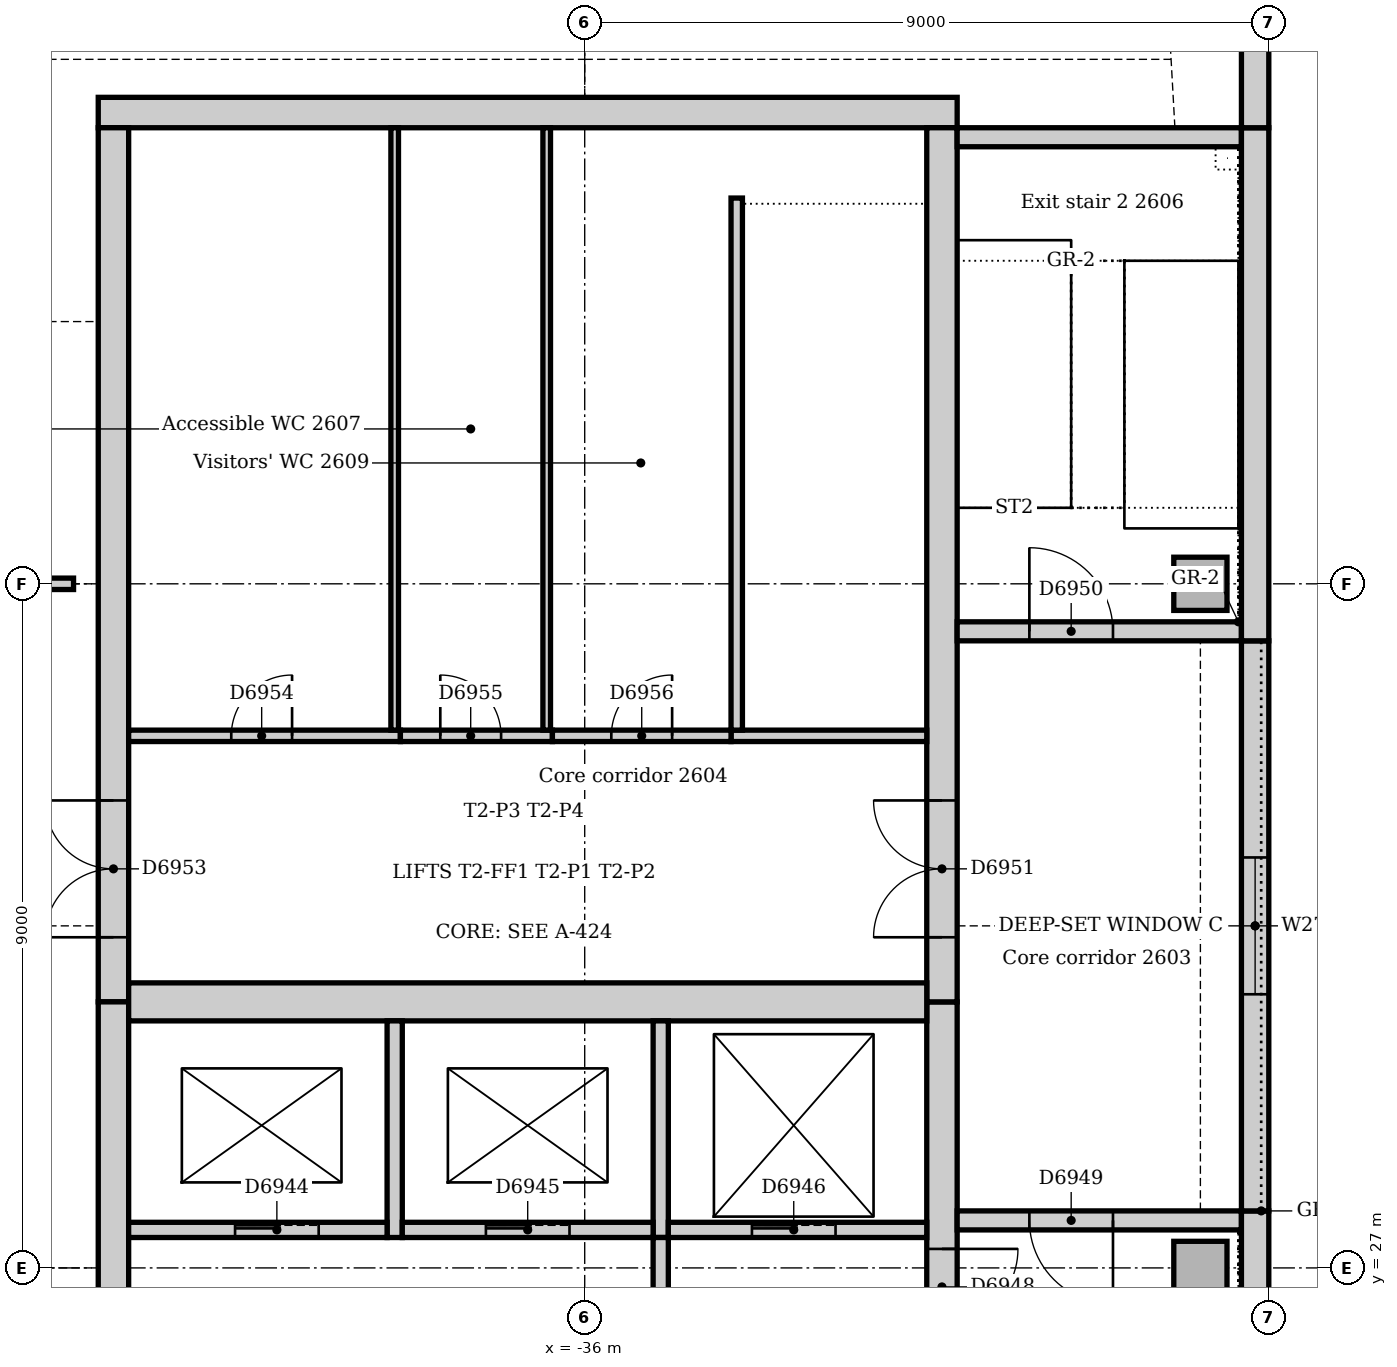
"""IFC4 building model, lengths in metres.
Left out: names, types, materials, properties, quantities, classifications, styles, units other than length and angle.
Written with IfcOpenShell. Run it as: python <this file> out.ifc"""

import sys

from ifc_helpers import new_model, si_unit, direction, frame, frame_2d, origin, origin_2d, place, context, subcontext, project, spatial, rectangle, extrude, element, fill, save


model = new_model("IFC4")
c1 = context("Model", 3, precision=1e-05, world=origin(), true_north=direction((0.0, 1.0)))
c2 = subcontext(c1, "Body", "Model", "MODEL_VIEW")
j1 = project(units=[si_unit("LENGTHUNIT", "METRE"), si_unit("PLANEANGLEUNIT", "RADIAN")], contexts=[c1])
p1 = place(None, origin())
s1 = spatial("IfcSite", under=j1, at=p1, CompositionType="ELEMENT")
p2 = place(p1, origin())
s2 = spatial("IfcBuilding", under=s1, at=p2, CompositionType="ELEMENT")
p3 = place(p2, frame((0.0, 0.0, 112.0)))
s3 = spatial("IfcBuildingStorey", under=s2, at=p3, CompositionType="ELEMENT", Elevation=112.0)
p4 = place(p3, frame((-31.1, 42.2, 0.0), z_axis=(0.0, 0.0, 1.0), x_axis=(-1.0, 0.0, 0.0)))
e1 = element("IfcWall", 1, at=p4, inside=s3, PredefinedType="SOLIDWALL", context=c2, shape_type="SweptSolid", body=[
    extrude(rectangle(XDim=11.3, YDim=0.4, at=frame_2d((5.65, 0.0))), origin(), (0.0, 0.0, 1.0), 4.0),
])
p5 = place(p3, frame((-31.3, 21.0, 0.0), z_axis=(0.0, 0.0, 1.0), x_axis=(0.0, 1.0, 0.0)))
e2 = element("IfcWall", 2, at=p5, inside=s3, PredefinedType="SOLIDWALL", context=c2, shape_type="SweptSolid", body=[
    extrude(rectangle(XDim=9.5, YDim=0.4, at=frame_2d((4.75, 0.0))), origin(), (0.0, 0.0, 1.0), 4.0),
])
p6 = place(p5, frame((5.25, 0.0, 0.0)))
e3 = element("IfcOpeningElement", 3, at=p6, cuts=e2, PredefinedType="OPENING", context=c2, shape_type="SweptSolid", body=[
    extrude(rectangle(XDim=1.0, YDim=2.1, at=frame_2d((0.5, 1.05))), frame((0.0, 0.21, 0.0), z_axis=(0.0, -1.0, 0.0), x_axis=(1.0, 0.0, 0.0)), (0.0, 0.0, 1.0), 0.42),
])
p7 = place(p3, frame((-31.3, 30.5, 0.0), z_axis=(0.0, 0.0, 1.0), x_axis=(0.0, 1.0, 0.0)))
e4 = element("IfcWall", 4, at=p7, inside=s3, PredefinedType="SOLIDWALL", context=c2, shape_type="SweptSolid", body=[
    extrude(rectangle(XDim=11.5, YDim=0.4, at=frame_2d((5.75, 0.0))), origin(), (0.0, 0.0, 1.0), 4.0),
])
p8 = place(p7, frame((0.85, 0.0, 0.0)))
e5 = element("IfcOpeningElement", 5, at=p8, cuts=e4, PredefinedType="OPENING", context=c2, shape_type="SweptSolid", body=[
    extrude(rectangle(XDim=1.8, YDim=2.1, at=frame_2d((0.9, 1.05))), frame((0.0, 0.21, 0.0), z_axis=(0.0, -1.0, 0.0), x_axis=(1.0, 0.0, 0.0)), (0.0, 0.0, 1.0), 0.42),
])
p9 = place(p3, frame((-42.2, 42.0, 0.0), z_axis=(0.0, 0.0, 1.0), x_axis=(0.0, -1.0, 0.0)))
e6 = element("IfcWall", 6, at=p9, inside=s3, PredefinedType="SOLIDWALL", context=c2, shape_type="SweptSolid", body=[
    extrude(rectangle(XDim=11.5, YDim=0.4, at=frame_2d((5.75, 0.0))), origin(), (0.0, 0.0, 1.0), 4.0),
])
p10 = place(p9, frame((8.85, 0.0, 0.0)))
e7 = element("IfcOpeningElement", 7, at=p10, cuts=e6, PredefinedType="OPENING", context=c2, shape_type="SweptSolid", body=[
    extrude(rectangle(XDim=1.8, YDim=2.1, at=frame_2d((0.9, 1.05))), frame((0.0, 0.21, 0.0), z_axis=(0.0, -1.0, 0.0), x_axis=(1.0, 0.0, 0.0)), (0.0, 0.0, 1.0), 0.42),
])
p11 = place(p3, frame((-42.2, 30.5, 0.0), z_axis=(0.0, 0.0, 1.0), x_axis=(0.0, -1.0, 0.0)))
e8 = element("IfcWall", 8, at=p11, inside=s3, PredefinedType="SOLIDWALL", context=c2, shape_type="SweptSolid", body=[
    extrude(rectangle(XDim=9.5, YDim=0.4, at=frame_2d((4.75, 0.0))), origin(), (0.0, 0.0, 1.0), 4.0),
])
p12 = place(p11, frame((3.85, 0.0, 0.0)))
e9 = element("IfcOpeningElement", 9, at=p12, cuts=e8, PredefinedType="OPENING", context=c2, shape_type="SweptSolid", body=[
    extrude(rectangle(XDim=1.8, YDim=2.1, at=frame_2d((0.9, 1.05))), frame((0.0, 0.21, 0.0), z_axis=(0.0, -1.0, 0.0), x_axis=(1.0, 0.0, 0.0)), (0.0, 0.0, 1.0), 0.42),
])
p13 = place(p3, frame((-42.0, 30.5, 0.0), z_axis=(0.0, 0.0, 1.0), x_axis=(1.0, 0.0, 0.0)))
e10 = element("IfcWall", 10, at=p13, inside=s3, PredefinedType="SOLIDWALL", context=c2, shape_type="SweptSolid", body=[
    extrude(rectangle(XDim=10.5, YDim=0.5, at=frame_2d((5.25, 0.0))), origin(), (0.0, 0.0, 1.0), 4.0),
])
p14 = place(p3, frame((-27.36, 27.625, 0.0), z_axis=(0.0, 0.0, 1.0), x_axis=(-1.0, 0.0, 0.0)))
e11 = element("IfcWall", 11, at=p14, inside=s3, PredefinedType="SOLIDWALL", context=c2, shape_type="SweptSolid", body=[
    extrude(rectangle(XDim=3.74, YDim=0.25, at=frame_2d((1.87, 0.0))), origin(), (0.0, 0.0, 1.0), 4.0),
])
p15 = place(p14, frame((1.69, 0.0, 0.0)))
e12 = element("IfcOpeningElement", 12, at=p15, cuts=e11, PredefinedType="OPENING", context=c2, shape_type="SweptSolid", body=[
    extrude(rectangle(XDim=1.1, YDim=2.1, at=frame_2d((0.55, 1.05))), frame((0.0, 0.135, 0.0), z_axis=(0.0, -1.0, 0.0), x_axis=(1.0, 0.0, 0.0)), (0.0, 0.0, 1.0), 0.27),
])
p16 = place(p3, frame((-31.1, 35.375, 0.0), z_axis=(0.0, 0.0, 1.0), x_axis=(1.0, 0.0, 0.0)))
e13 = element("IfcWall", 13, at=p16, inside=s3, PredefinedType="SOLIDWALL", context=c2, shape_type="SweptSolid", body=[
    extrude(rectangle(XDim=3.74, YDim=0.25, at=frame_2d((1.87, 0.0))), origin(), (0.0, 0.0, 1.0), 4.0),
])
p17 = place(p16, frame((0.95, 0.0, 0.0)))
e14 = element("IfcOpeningElement", 14, at=p17, cuts=e13, PredefinedType="OPENING", context=c2, shape_type="SweptSolid", body=[
    extrude(rectangle(XDim=1.1, YDim=2.1, at=frame_2d((0.55, 1.05))), frame((0.0, 0.135, 0.0), z_axis=(0.0, -1.0, 0.0), x_axis=(1.0, 0.0, 0.0)), (0.0, 0.0, 1.0), 0.27),
])
p18 = place(p3, frame((-27.36, 41.875, 0.0), z_axis=(0.0, 0.0, 1.0), x_axis=(-1.0, 0.0, 0.0)))
e15 = element("IfcWall", 15, at=p18, inside=s3, PredefinedType="SOLIDWALL", context=c2, shape_type="SweptSolid", body=[
    extrude(rectangle(XDim=3.74, YDim=0.25, at=frame_2d((1.87, 0.0))), origin(), (0.0, 0.0, 1.0), 4.0),
])
for number, where, z_axis, x_axis in (
    (16, (-27.9, 27.0, 0.0), (0.0, 0.0, 1.0), (1.0, 0.0, 0.0)),
    (17, (-27.9, 36.0, 0.0), (0.0, 0.0, 1.0), (1.0, 0.0, 0.0)),
):
    element("IfcColumn", number, at=place(p3, frame(where, z_axis=z_axis, x_axis=x_axis)), inside=s3, PredefinedType="COLUMN", context=c2, shape_type="SweptSolid", body=[
        extrude(rectangle(XDim=0.7, YDim=0.7, at=origin_2d()), origin(), (0.0, 0.0, 1.0), 4.0),
    ])
p19 = place(p3, frame((-27.18, 21.0, 0.0), z_axis=(0.0, 0.0, 1.0), x_axis=(0.0, 1.0, 0.0)))
e18 = element("IfcWall", 18, at=p19, inside=s3, PredefinedType="STANDARD", context=c2, shape_type="SweptSolid", body=[
    extrude(rectangle(XDim=6.75, YDim=0.36, at=frame_2d((3.375, 0.0))), origin(), (0.0, 0.0, 1.0), 3.85),
])
p20 = place(p3, frame((-27.18, 27.75, 0.0), z_axis=(0.0, 0.0, 1.0), x_axis=(0.0, 1.0, 0.0)))
e19 = element("IfcWall", 19, at=p20, inside=s3, PredefinedType="STANDARD", context=c2, shape_type="SweptSolid", body=[
    extrude(rectangle(XDim=7.5, YDim=0.36, at=frame_2d((3.75, 0.0))), origin(), (0.0, 0.0, 1.0), 3.85),
])
p21 = place(p20, frame((2.85, 0.0, 1.2)))
e20 = element("IfcOpeningElement", 20, at=p21, cuts=e19, PredefinedType="OPENING", context=c2, shape_type="SweptSolid", body=[
    extrude(rectangle(XDim=1.8, YDim=1.2, at=frame_2d((0.9, 0.6))), frame((0.0, 0.19, 0.0), z_axis=(0.0, -1.0, 0.0), x_axis=(1.0, 0.0, 0.0)), (0.0, 0.0, 1.0), 0.38),
])
p22 = place(p3, frame((-27.18, 35.25, 0.0), z_axis=(0.0, 0.0, 1.0), x_axis=(0.0, 1.0, 0.0)))
e21 = element("IfcWall", 21, at=p22, inside=s3, PredefinedType="STANDARD", context=c2, shape_type="SweptSolid", body=[
    extrude(rectangle(XDim=6.75, YDim=0.36, at=frame_2d((3.375, 0.0))), origin(), (0.0, 0.0, 1.0), 3.85),
])
p23 = place(p3, frame((-27.18, 42.0, 0.0), z_axis=(0.0, 0.0, 1.0), x_axis=(0.0, 1.0, 0.0)))
e22 = element("IfcWall", 22, at=p23, inside=s3, PredefinedType="STANDARD", context=c2, shape_type="SweptSolid", body=[
    extrude(rectangle(XDim=3.257, YDim=0.36, at=frame_2d((1.629, 0.0))), origin(), (0.0, 0.0, 1.0), 3.85),
])
p24 = place(p3, frame((-38.5, 27.4, 0.0), z_axis=(0.0, 0.0, 1.0), x_axis=(0.0, 1.0, 0.0)))
e23 = element("IfcWall", 23, at=p24, inside=s3, PredefinedType="SOLIDWALL", context=c2, shape_type="SweptSolid", body=[
    extrude(rectangle(XDim=2.85, YDim=0.2, at=frame_2d((1.425, 0.0))), origin(), (0.0, 0.0, 1.0), 4.0),
])
p25 = place(p3, frame((-42.0, 27.5, 0.0), z_axis=(0.0, 0.0, 1.0), x_axis=(1.0, 0.0, 0.0)))
e24 = element("IfcWall", 24, at=p25, inside=s3, PredefinedType="SOLIDWALL", context=c2, shape_type="SweptSolid", body=[
    extrude(rectangle(XDim=3.4, YDim=0.2, at=frame_2d((1.7, 0.0))), origin(), (0.0, 0.0, 1.0), 4.0),
])
p26 = place(p25, frame((1.4, 0.0, 0.0)))
e25 = element("IfcOpeningElement", 25, at=p26, cuts=e24, PredefinedType="OPENING", context=c2, shape_type="SweptSolid", body=[
    extrude(rectangle(XDim=1.1, YDim=2.1, at=frame_2d((0.55, 1.05))), frame((0.0, 0.11, 0.0), z_axis=(0.0, -1.0, 0.0), x_axis=(1.0, 0.0, 0.0)), (0.0, 0.0, 1.0), 0.22),
])
p27 = place(p3, frame((-35.0, 27.4, 0.0), z_axis=(0.0, 0.0, 1.0), x_axis=(0.0, 1.0, 0.0)))
e26 = element("IfcWall", 26, at=p27, inside=s3, PredefinedType="SOLIDWALL", context=c2, shape_type="SweptSolid", body=[
    extrude(rectangle(XDim=2.85, YDim=0.2, at=frame_2d((1.425, 0.0))), origin(), (0.0, 0.0, 1.0), 4.0),
])
p28 = place(p3, frame((-38.4, 27.5, 0.0), z_axis=(0.0, 0.0, 1.0), x_axis=(1.0, 0.0, 0.0)))
e27 = element("IfcWall", 27, at=p28, inside=s3, PredefinedType="SOLIDWALL", context=c2, shape_type="SweptSolid", body=[
    extrude(rectangle(XDim=3.3, YDim=0.2, at=frame_2d((1.65, 0.0))), origin(), (0.0, 0.0, 1.0), 4.0),
])
p29 = place(p28, frame((1.1, 0.0, 0.0)))
e28 = element("IfcOpeningElement", 28, at=p29, cuts=e27, PredefinedType="OPENING", context=c2, shape_type="SweptSolid", body=[
    extrude(rectangle(XDim=1.1, YDim=2.1, at=frame_2d((0.55, 1.05))), frame((0.0, 0.11, 0.0), z_axis=(0.0, -1.0, 0.0), x_axis=(1.0, 0.0, 0.0)), (0.0, 0.0, 1.0), 0.22),
])
p30 = place(p3, frame((-34.9, 27.5, 0.0), z_axis=(0.0, 0.0, 1.0), x_axis=(1.0, 0.0, 0.0)))
e29 = element("IfcWall", 29, at=p30, inside=s3, PredefinedType="SOLIDWALL", context=c2, shape_type="SweptSolid", body=[
    extrude(rectangle(XDim=3.4, YDim=0.2, at=frame_2d((1.7, 0.0))), origin(), (0.0, 0.0, 1.0), 4.0),
])
p31 = place(p30, frame((1.1, 0.0, 0.0)))
e30 = element("IfcOpeningElement", 30, at=p31, cuts=e29, PredefinedType="OPENING", context=c2, shape_type="SweptSolid", body=[
    extrude(rectangle(XDim=1.1, YDim=2.1, at=frame_2d((0.55, 1.05))), frame((0.0, 0.11, 0.0), z_axis=(0.0, -1.0, 0.0), x_axis=(1.0, 0.0, 0.0)), (0.0, 0.0, 1.0), 0.22),
])
p32 = place(p3, frame((-35.0, 24.1, 0.0), z_axis=(0.0, 0.0, 1.0), x_axis=(0.0, 1.0, 0.0)))
e31 = element("IfcWall", 31, at=p32, inside=s3, PredefinedType="SOLIDWALL", context=c2, shape_type="SweptSolid", body=[
    extrude(rectangle(XDim=3.3, YDim=0.2, at=frame_2d((1.65, 0.0))), origin(), (0.0, 0.0, 1.0), 4.0),
])
p33 = place(p32, frame((1.15, 0.0, 0.0)))
e32 = element("IfcOpeningElement", 32, at=p33, cuts=e31, PredefinedType="OPENING", context=c2, shape_type="SweptSolid", body=[
    extrude(rectangle(XDim=1.0, YDim=2.1, at=frame_2d((0.5, 1.05))), frame((0.0, 0.11, 0.0), z_axis=(0.0, -1.0, 0.0), x_axis=(1.0, 0.0, 0.0)), (0.0, 0.0, 1.0), 0.22),
])
p34 = place(p3, frame((-34.075, 34.0, 0.0), z_axis=(0.0, 0.0, 1.0), x_axis=(1.0, 0.0, 0.0)))
e33 = element("IfcWall", 33, at=p34, inside=s3, PredefinedType="SOLIDWALL", context=c2, shape_type="SweptSolid", body=[
    extrude(rectangle(XDim=2.575, YDim=0.15, at=frame_2d((1.288, 0.0))), origin(), (0.0, 0.0, 1.0), 4.0),
])
p35 = place(p3, frame((-34.0, 41.075, 0.0), z_axis=(0.0, 0.0, 1.0), x_axis=(0.0, -1.0, 0.0)))
e34 = element("IfcWall", 34, at=p35, inside=s3, PredefinedType="SOLIDWALL", context=c2, shape_type="SweptSolid", body=[
    extrude(rectangle(XDim=7.0, YDim=0.15, at=frame_2d((3.5, 0.0))), origin(), (0.0, 0.0, 1.0), 4.0),
])
p36 = place(p3, frame((-38.425, 34.0, 0.0), z_axis=(0.0, 0.0, 1.0), x_axis=(-1.0, 0.0, 0.0)))
e35 = element("IfcWall", 35, at=p36, inside=s3, PredefinedType="PARTITIONING", context=c2, shape_type="SweptSolid", body=[
    extrude(rectangle(XDim=3.575, YDim=0.15, at=frame_2d((1.788, 0.0))), origin(), (0.0, 0.0, 1.0), 3.85),
])
p37 = place(p36, frame((1.425, 0.0, 0.0)))
e36 = element("IfcOpeningElement", 36, at=p37, cuts=e35, PredefinedType="OPENING", context=c2, shape_type="SweptSolid", body=[
    extrude(rectangle(XDim=0.8, YDim=2.1, at=frame_2d((0.4, 1.05))), frame((0.0, 0.085, 0.0), z_axis=(0.0, -1.0, 0.0), x_axis=(1.0, 0.0, 0.0)), (0.0, 0.0, 1.0), 0.17),
])
p38 = place(p3, frame((-36.425, 34.0, 0.0), z_axis=(0.0, 0.0, 1.0), x_axis=(-1.0, 0.0, 0.0)))
e37 = element("IfcWall", 37, at=p38, inside=s3, PredefinedType="PARTITIONING", context=c2, shape_type="SweptSolid", body=[
    extrude(rectangle(XDim=2.0, YDim=0.15, at=frame_2d((1.0, 0.0))), origin(), (0.0, 0.0, 1.0), 3.85),
])
p39 = place(p38, frame((0.675, 0.0, 0.0)))
e38 = element("IfcOpeningElement", 38, at=p39, cuts=e37, PredefinedType="OPENING", context=c2, shape_type="SweptSolid", body=[
    extrude(rectangle(XDim=0.8, YDim=2.1, at=frame_2d((0.4, 1.05))), frame((0.0, 0.085, 0.0), z_axis=(0.0, -1.0, 0.0), x_axis=(1.0, 0.0, 0.0)), (0.0, 0.0, 1.0), 0.17),
])
p40 = place(p3, frame((-34.075, 34.0, 0.0), z_axis=(0.0, 0.0, 1.0), x_axis=(-1.0, 0.0, 0.0)))
e39 = element("IfcWall", 39, at=p40, inside=s3, PredefinedType="PARTITIONING", context=c2, shape_type="SweptSolid", body=[
    extrude(rectangle(XDim=2.35, YDim=0.15, at=frame_2d((1.175, 0.0))), origin(), (0.0, 0.0, 1.0), 3.85),
])
p41 = place(p40, frame((0.775, 0.0, 0.0)))
e40 = element("IfcOpeningElement", 40, at=p41, cuts=e39, PredefinedType="OPENING", context=c2, shape_type="SweptSolid", body=[
    extrude(rectangle(XDim=0.8, YDim=2.1, at=frame_2d((0.4, 1.05))), frame((0.0, 0.085, 0.0), z_axis=(0.0, -1.0, 0.0), x_axis=(1.0, 0.0, 0.0)), (0.0, 0.0, 1.0), 0.17),
])
for number, where, z_axis, x_axis in (
    (41, (-38.5, 34.075, 0.0), (0.0, 0.0, 1.0), (0.0, 1.0, 0.0)),
    (42, (-36.5, 34.075, 0.0), (0.0, 0.0, 1.0), (0.0, 1.0, 0.0)),
):
    element("IfcWall", number, at=place(p3, frame(where, z_axis=z_axis, x_axis=x_axis)), inside=s3, PredefinedType="PARTITIONING", context=c2, shape_type="SweptSolid", body=[
        extrude(rectangle(XDim=7.925, YDim=0.1, at=frame_2d((3.962, 0.0))), origin(), (0.0, 0.0, 1.0), 3.85),
    ])
p42 = place(p3, frame((-44.7, 36.0, 0.0), z_axis=(0.0, 0.0, 1.0), x_axis=(1.0, 0.0, 0.0)))
e43 = element("IfcWall", 43, at=p42, inside=s3, PredefinedType="PARTITIONING", context=c2, shape_type="SweptSolid", body=[
    extrude(rectangle(XDim=1.975, YDim=0.15, at=frame_2d((0.988, 0.0))), origin(), (0.0, 0.0, 1.0), 3.602),
])
p43 = place(p42, frame((0.55, 0.0, 0.0)))
e44 = element("IfcOpeningElement", 44, at=p43, cuts=e43, PredefinedType="OPENING", context=c2, shape_type="SweptSolid", body=[
    extrude(rectangle(XDim=0.9, YDim=2.1, at=frame_2d((0.45, 1.05))), frame((0.0, 0.085, 0.0), z_axis=(0.0, -1.0, 0.0), x_axis=(1.0, 0.0, 0.0)), (0.0, 0.0, 1.0), 0.17),
])
p44 = place(p21, origin())
e45 = element("IfcWindow", 45, at=p44, inside=s3, PartitioningType="SINGLE_PANEL", PredefinedType="WINDOW", context=c2, shape_type="SweptSolid", body=[
    extrude(rectangle(XDim=1.8, YDim=1.2, at=frame_2d((0.9, 0.6))), frame((0.0, 0.13, 0.0), z_axis=(0.0, -1.0, 0.0), x_axis=(1.0, 0.0, 0.0)), (0.0, 0.0, 1.0), 0.06),
])
fill(e20, e45)
p45 = place(p26, origin())
e46 = element("IfcDoor", 46, at=p45, inside=s3, OperationType="SLIDING_TO_LEFT", PredefinedType="DOOR", context=c2, shape_type="SweptSolid", body=[
    extrude(rectangle(XDim=1.1, YDim=2.1, at=frame_2d((0.55, 1.05))), frame((0.0, 0.025, 0.0), z_axis=(0.0, -1.0, 0.0), x_axis=(1.0, 0.0, 0.0)), (0.0, 0.0, 1.0), 0.05),
])
fill(e25, e46)
p46 = place(p29, origin())
e47 = element("IfcDoor", 47, at=p46, inside=s3, OperationType="SLIDING_TO_LEFT", PredefinedType="DOOR", context=c2, shape_type="SweptSolid", body=[
    extrude(rectangle(XDim=1.1, YDim=2.1, at=frame_2d((0.55, 1.05))), frame((0.0, 0.025, 0.0), z_axis=(0.0, -1.0, 0.0), x_axis=(1.0, 0.0, 0.0)), (0.0, 0.0, 1.0), 0.05),
])
fill(e28, e47)
p47 = place(p31, origin())
e48 = element("IfcDoor", 48, at=p47, inside=s3, OperationType="SLIDING_TO_LEFT", PredefinedType="DOOR", context=c2, shape_type="SweptSolid", body=[
    extrude(rectangle(XDim=1.1, YDim=2.1, at=frame_2d((0.55, 1.05))), frame((0.0, 0.025, 0.0), z_axis=(0.0, -1.0, 0.0), x_axis=(1.0, 0.0, 0.0)), (0.0, 0.0, 1.0), 0.05),
])
fill(e30, e48)
p48 = place(p6, frame((1.0, 0.0, 0.0), z_axis=(0.0, 0.0, 1.0), x_axis=(-1.0, 0.0, 0.0)))
e49 = element("IfcDoor", 49, at=p48, inside=s3, OperationType="SINGLE_SWING_LEFT", PredefinedType="DOOR", context=c2, shape_type="SweptSolid", body=[
    extrude(rectangle(XDim=1.0, YDim=2.1, at=frame_2d((0.5, 1.05))), frame((0.0, 0.025, 0.0), z_axis=(0.0, -1.0, 0.0), x_axis=(1.0, 0.0, 0.0)), (0.0, 0.0, 1.0), 0.05),
])
fill(e3, e49)
p49 = place(p15, origin())
e50 = element("IfcDoor", 50, at=p49, inside=s3, OperationType="SINGLE_SWING_LEFT", PredefinedType="DOOR", context=c2, shape_type="SweptSolid", body=[
    extrude(rectangle(XDim=1.1, YDim=2.1, at=frame_2d((0.55, 1.05))), frame((0.0, 0.025, 0.0), z_axis=(0.0, -1.0, 0.0), x_axis=(1.0, 0.0, 0.0)), (0.0, 0.0, 1.0), 0.05),
])
fill(e12, e50)
p50 = place(p17, origin())
e51 = element("IfcDoor", 51, at=p50, inside=s3, OperationType="SINGLE_SWING_LEFT", PredefinedType="DOOR", context=c2, shape_type="SweptSolid", body=[
    extrude(rectangle(XDim=1.1, YDim=2.1, at=frame_2d((0.55, 1.05))), frame((0.0, 0.025, 0.0), z_axis=(0.0, -1.0, 0.0), x_axis=(1.0, 0.0, 0.0)), (0.0, 0.0, 1.0), 0.05),
])
fill(e14, e51)
p51 = place(p8, origin())
e52 = element("IfcDoor", 52, at=p51, inside=s3, OperationType="DOUBLE_DOOR_SINGLE_SWING", PredefinedType="DOOR", context=c2, shape_type="SweptSolid", body=[
    extrude(rectangle(XDim=1.8, YDim=2.1, at=frame_2d((0.9, 1.05))), frame((0.0, 0.025, 0.0), z_axis=(0.0, -1.0, 0.0), x_axis=(1.0, 0.0, 0.0)), (0.0, 0.0, 1.0), 0.05),
])
fill(e5, e52)
p52 = place(p10, frame((1.8, 0.0, 0.0), z_axis=(0.0, 0.0, 1.0), x_axis=(-1.0, 0.0, 0.0)))
e53 = element("IfcDoor", 53, at=p52, inside=s3, OperationType="DOUBLE_DOOR_SINGLE_SWING", PredefinedType="DOOR", context=c2, shape_type="SweptSolid", body=[
    extrude(rectangle(XDim=1.8, YDim=2.1, at=frame_2d((0.9, 1.05))), frame((0.0, 0.025, 0.0), z_axis=(0.0, -1.0, 0.0), x_axis=(1.0, 0.0, 0.0)), (0.0, 0.0, 1.0), 0.05),
])
fill(e7, e53)
p53 = place(p37, frame((0.8, 0.0, 0.0), z_axis=(0.0, 0.0, 1.0), x_axis=(-1.0, 0.0, 0.0)))
e54 = element("IfcDoor", 54, at=p53, inside=s3, OperationType="SINGLE_SWING_RIGHT", PredefinedType="DOOR", context=c2, shape_type="SweptSolid", body=[
    extrude(rectangle(XDim=0.8, YDim=2.1, at=frame_2d((0.4, 1.05))), frame((0.0, 0.025, 0.0), z_axis=(0.0, -1.0, 0.0), x_axis=(1.0, 0.0, 0.0)), (0.0, 0.0, 1.0), 0.05),
])
fill(e36, e54)
p54 = place(p39, frame((0.8, 0.0, 0.0), z_axis=(0.0, 0.0, 1.0), x_axis=(-1.0, 0.0, 0.0)))
e55 = element("IfcDoor", 55, at=p54, inside=s3, OperationType="SINGLE_SWING_LEFT", PredefinedType="DOOR", context=c2, shape_type="SweptSolid", body=[
    extrude(rectangle(XDim=0.8, YDim=2.1, at=frame_2d((0.4, 1.05))), frame((0.0, 0.025, 0.0), z_axis=(0.0, -1.0, 0.0), x_axis=(1.0, 0.0, 0.0)), (0.0, 0.0, 1.0), 0.05),
])
fill(e38, e55)
p55 = place(p41, frame((0.8, 0.0, 0.0), z_axis=(0.0, 0.0, 1.0), x_axis=(-1.0, 0.0, 0.0)))
e56 = element("IfcDoor", 56, at=p55, inside=s3, OperationType="SINGLE_SWING_RIGHT", PredefinedType="DOOR", context=c2, shape_type="SweptSolid", body=[
    extrude(rectangle(XDim=0.8, YDim=2.1, at=frame_2d((0.4, 1.05))), frame((0.0, 0.025, 0.0), z_axis=(0.0, -1.0, 0.0), x_axis=(1.0, 0.0, 0.0)), (0.0, 0.0, 1.0), 0.05),
])
fill(e40, e56)
save(model, sys.argv[1])
